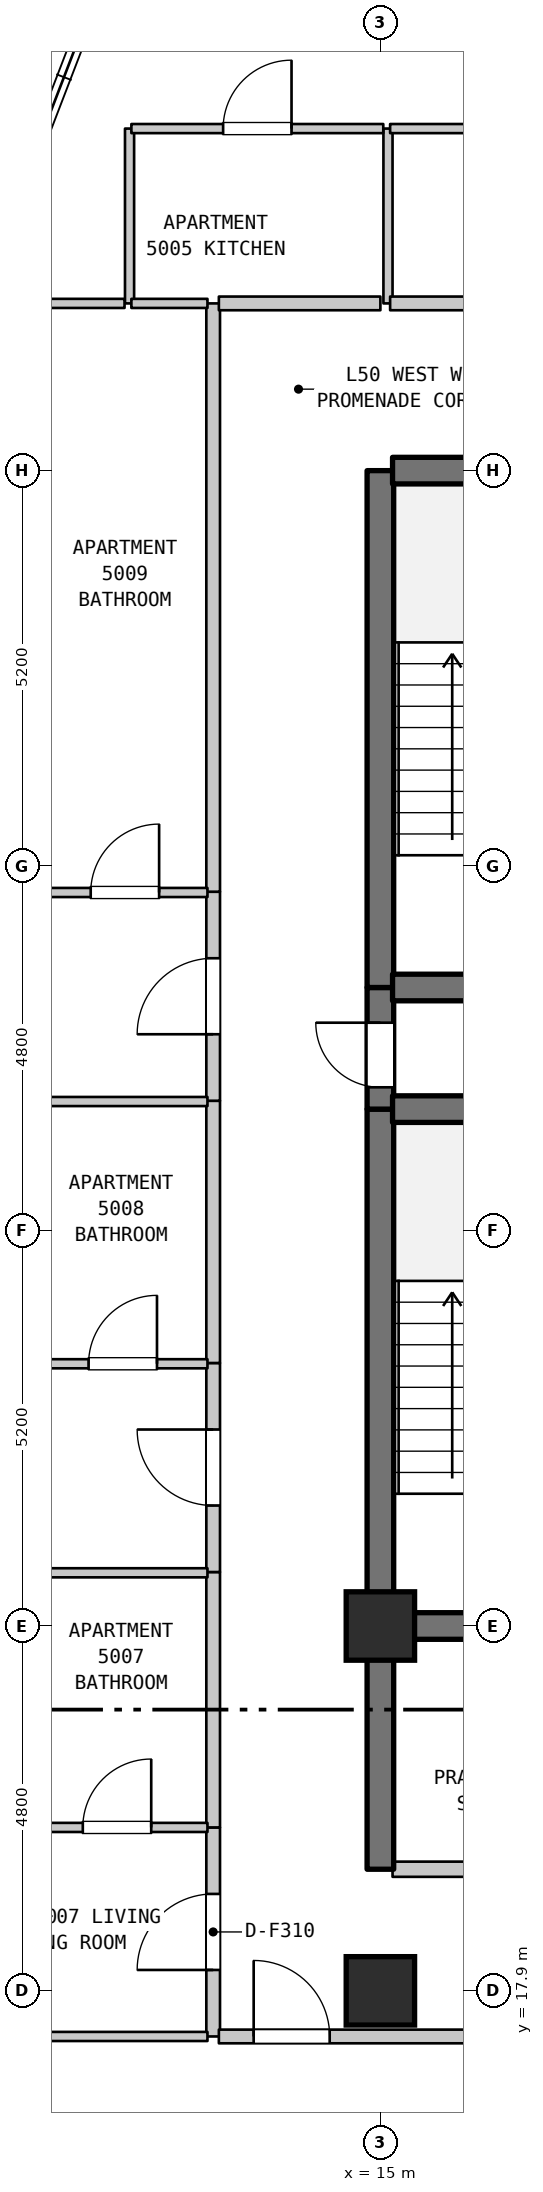
"""IFC4 building model, lengths in metres.
Left out: names, types, materials, properties, quantities, classifications, styles, units other than length and angle.
Written with IfcOpenShell. Run it as: python <this file> out.ifc"""

import sys

from ifc_helpers import new_model, si_unit, direction, frame, frame_2d, origin, origin_2d, place, context, subcontext, project, spatial, rectangle, extrude, element, fill, save


model = new_model("IFC4")
c1 = context("Model", 3, precision=1e-05, world=origin(), true_north=direction((0.0, 1.0)))
c2 = subcontext(c1, "Body", "Model", "MODEL_VIEW")
j1 = project(units=[si_unit("LENGTHUNIT", "METRE"), si_unit("PLANEANGLEUNIT", "RADIAN")], contexts=[c1])
p1 = place(None, origin())
s1 = spatial("IfcSite", under=j1, at=p1, CompositionType="ELEMENT")
p2 = place(p1, origin())
s2 = spatial("IfcBuilding", under=s1, at=p2, CompositionType="ELEMENT")
p3 = place(p2, frame((0.0, 0.0, 203.2)))
s3 = spatial("IfcBuildingStorey", under=s2, at=p3, CompositionType="ELEMENT", Elevation=203.2)
for number, where, z_axis, x_axis in (
    (1, (15.0, 17.9, 0.0), (0.0, 0.0, 1.0), (1.0, 0.0, 0.0)),
    (2, (15.0, 22.7, 0.0), (0.0, 0.0, 1.0), (1.0, 0.0, 0.0)),
):
    element("IfcColumn", number, at=place(p3, frame(where, z_axis=z_axis, x_axis=x_axis)), inside=s3, PredefinedType="COLUMN", context=c2, shape_type="SweptSolid", body=[
        extrude(rectangle(XDim=0.9, YDim=0.9, at=origin_2d()), origin(), (0.0, 0.0, 1.0), 3.7),
    ])
p4 = place(p3, frame((11.7, 40.1, 0.0), z_axis=(0.0, 0.0, 1.0), x_axis=(0.0, 1.0, 0.0)))
e3 = element("IfcWall", 3, at=p4, inside=s3, PredefinedType="PARTITIONING", context=c2, shape_type="SweptSolid", body=[
    extrude(rectangle(XDim=2.3, YDim=0.12, at=frame_2d((1.15, 0.0))), origin(), (0.0, 0.0, 1.0), 3.39),
])
p5 = place(p3, frame((12.8, 17.3, 0.0), z_axis=(0.0, 0.0, 1.0), x_axis=(0.0, 1.0, 0.0)))
e4 = element("IfcWall", 4, at=p5, inside=s3, PredefinedType="STANDARD", context=c2, shape_type="SweptSolid", body=[
    extrude(rectangle(XDim=2.75, YDim=0.18, at=frame_2d((1.375, 0.0))), origin(), (0.0, 0.0, 1.0), 3.39),
])
p6 = place(p5, frame((0.875, 0.0, 0.0)))
e5 = element("IfcOpeningElement", 5, at=p6, cuts=e4, PredefinedType="OPENING", context=c2, shape_type="SweptSolid", body=[
    extrude(rectangle(XDim=1.0, YDim=2.15, at=frame_2d((0.5, 1.075))), frame((0.0, 0.1, 0.0), z_axis=(0.0, -1.0, 0.0), x_axis=(1.0, 0.0, 0.0)), (0.0, 0.0, 1.0), 0.2),
])
p7 = place(p3, frame((12.8, 20.05, 0.0), z_axis=(0.0, 0.0, 1.0), x_axis=(0.0, 1.0, 0.0)))
e6 = element("IfcWall", 6, at=p7, inside=s3, PredefinedType="STANDARD", context=c2, shape_type="SweptSolid", body=[
    extrude(rectangle(XDim=3.36, YDim=0.18, at=frame_2d((1.68, 0.0))), origin(), (0.0, 0.0, 1.0), 3.39),
])
p8 = place(p3, frame((12.8, 23.41, 0.0), z_axis=(0.0, 0.0, 1.0), x_axis=(0.0, 1.0, 0.0)))
e7 = element("IfcWall", 7, at=p8, inside=s3, PredefinedType="STANDARD", context=c2, shape_type="SweptSolid", body=[
    extrude(rectangle(XDim=2.75, YDim=0.18, at=frame_2d((1.375, 0.0))), origin(), (0.0, 0.0, 1.0), 3.39),
])
p9 = place(p8, frame((0.875, 0.0, 0.0)))
e8 = element("IfcOpeningElement", 8, at=p9, cuts=e7, PredefinedType="OPENING", context=c2, shape_type="SweptSolid", body=[
    extrude(rectangle(XDim=1.0, YDim=2.15, at=frame_2d((0.5, 1.075))), frame((0.0, 0.1, 0.0), z_axis=(0.0, -1.0, 0.0), x_axis=(1.0, 0.0, 0.0)), (0.0, 0.0, 1.0), 0.2),
])
p10 = place(p3, frame((12.8, 26.16, 0.0), z_axis=(0.0, 0.0, 1.0), x_axis=(0.0, 1.0, 0.0)))
e9 = element("IfcWall", 9, at=p10, inside=s3, PredefinedType="STANDARD", context=c2, shape_type="SweptSolid", body=[
    extrude(rectangle(XDim=3.45, YDim=0.18, at=frame_2d((1.725, 0.0))), origin(), (0.0, 0.0, 1.0), 3.39),
])
p11 = place(p3, frame((12.8, 29.61, 0.0), z_axis=(0.0, 0.0, 1.0), x_axis=(0.0, 1.0, 0.0)))
e10 = element("IfcWall", 10, at=p11, inside=s3, PredefinedType="STANDARD", context=c2, shape_type="SweptSolid", body=[
    extrude(rectangle(XDim=2.75, YDim=0.18, at=frame_2d((1.375, 0.0))), origin(), (0.0, 0.0, 1.0), 3.39),
])
p12 = place(p11, frame((0.875, 0.0, 0.0)))
e11 = element("IfcOpeningElement", 11, at=p12, cuts=e10, PredefinedType="OPENING", context=c2, shape_type="SweptSolid", body=[
    extrude(rectangle(XDim=1.0, YDim=2.15, at=frame_2d((0.5, 1.075))), frame((0.0, 0.1, 0.0), z_axis=(0.0, -1.0, 0.0), x_axis=(1.0, 0.0, 0.0)), (0.0, 0.0, 1.0), 0.2),
])
p13 = place(p3, frame((12.8, 32.36, 0.0), z_axis=(0.0, 0.0, 1.0), x_axis=(0.0, 1.0, 0.0)))
e12 = element("IfcWall", 12, at=p13, inside=s3, PredefinedType="STANDARD", context=c2, shape_type="SweptSolid", body=[
    extrude(rectangle(XDim=7.74, YDim=0.18, at=frame_2d((3.87, 0.0))), origin(), (0.0, 0.0, 1.0), 3.39),
])
p14 = place(p3, frame((15.0, 19.5, 0.0), z_axis=(0.0, 0.0, 1.0), x_axis=(0.0, 1.0, 0.0)))
e13 = element("IfcWall", 13, at=p14, inside=s3, PredefinedType="SHEAR", context=c2, shape_type="SweptSolid", body=[
    extrude(rectangle(XDim=3.2, YDim=0.35, at=frame_2d((1.6, 0.0))), origin(), (0.0, 0.0, 1.0), 3.39),
])
p15 = place(p3, frame((15.0, 22.7, 0.0), z_axis=(0.0, 0.0, 1.0), x_axis=(0.0, 1.0, 0.0)))
e14 = element("IfcWall", 14, at=p15, inside=s3, PredefinedType="SHEAR", context=c2, shape_type="SweptSolid", body=[
    extrude(rectangle(XDim=6.8, YDim=0.35, at=frame_2d((3.4, 0.0))), origin(), (0.0, 0.0, 1.0), 3.39),
])
p16 = place(p3, frame((15.0, 29.5, 0.0), z_axis=(0.0, 0.0, 1.0), x_axis=(0.0, 1.0, 0.0)))
e15 = element("IfcWall", 15, at=p16, inside=s3, PredefinedType="SHEAR", context=c2, shape_type="SweptSolid", body=[
    extrude(rectangle(XDim=1.6, YDim=0.35, at=frame_2d((0.8, 0.0))), origin(), (0.0, 0.0, 1.0), 3.39),
])
p17 = place(p16, frame((0.287, 0.0, 0.0)))
e16 = element("IfcOpeningElement", 16, at=p17, cuts=e15, PredefinedType="OPENING", context=c2, shape_type="SweptSolid", body=[
    extrude(rectangle(XDim=0.85, YDim=2.1, at=frame_2d((0.425, 1.05))), frame((0.0, 0.185, 0.0), z_axis=(0.0, -1.0, 0.0), x_axis=(1.0, 0.0, 0.0)), (0.0, 0.0, 1.0), 0.37),
])
p18 = place(p3, frame((15.0, 31.1, 0.0), z_axis=(0.0, 0.0, 1.0), x_axis=(0.0, 1.0, 0.0)))
e17 = element("IfcWall", 17, at=p18, inside=s3, PredefinedType="SHEAR", context=c2, shape_type="SweptSolid", body=[
    extrude(rectangle(XDim=6.8, YDim=0.35, at=frame_2d((3.4, 0.0))), origin(), (0.0, 0.0, 1.0), 3.39),
])
p19 = place(p3, frame((15.1, 40.1, 0.0), z_axis=(0.0, 0.0, 1.0), x_axis=(0.0, 1.0, 0.0)))
e18 = element("IfcWall", 18, at=p19, inside=s3, PredefinedType="PARTITIONING", context=c2, shape_type="SweptSolid", body=[
    extrude(rectangle(XDim=2.3, YDim=0.12, at=frame_2d((1.15, 0.0))), origin(), (0.0, 0.0, 1.0), 3.39),
])
p20 = place(p3, frame((9.085, 17.3, 0.0), z_axis=(0.0, 0.0, 1.0), x_axis=(1.0, 0.0, 0.0)))
e19 = element("IfcWall", 19, at=p20, inside=s3, PredefinedType="PARTITIONING", context=c2, shape_type="SweptSolid", body=[
    extrude(rectangle(XDim=3.64, YDim=0.12, at=frame_2d((1.82, 0.0))), origin(), (0.0, 0.0, 1.0), 3.39),
])
p21 = place(p3, frame((12.875, 17.3, 0.0), z_axis=(0.0, 0.0, 1.0), x_axis=(1.0, 0.0, 0.0)))
e20 = element("IfcWall", 20, at=p21, inside=s3, PredefinedType="STANDARD", context=c2, shape_type="SweptSolid", body=[
    extrude(rectangle(XDim=3.78, YDim=0.18, at=frame_2d((1.89, 0.0))), origin(), (0.0, 0.0, 1.0), 3.39),
])
p22 = place(p21, frame((0.458, 0.0, 0.0)))
e21 = element("IfcOpeningElement", 21, at=p22, cuts=e20, PredefinedType="OPENING", context=c2, shape_type="SweptSolid", body=[
    extrude(rectangle(XDim=1.0, YDim=2.15, at=frame_2d((0.5, 1.075))), frame((0.0, 0.1, 0.0), z_axis=(0.0, -1.0, 0.0), x_axis=(1.0, 0.0, 0.0)), (0.0, 0.0, 1.0), 0.2),
])
p23 = place(p3, frame((15.16, 19.5, 0.0), z_axis=(0.0, 0.0, 1.0), x_axis=(1.0, 0.0, 0.0)))
e22 = element("IfcWall", 22, at=p23, inside=s3, PredefinedType="STANDARD", context=c2, shape_type="SweptSolid", body=[
    extrude(rectangle(XDim=3.68, YDim=0.2, at=frame_2d((1.84, 0.0))), origin(), (0.0, 0.0, 1.0), 3.39),
])
p24 = place(p23, frame((1.39, 0.0, 0.0)))
e23 = element("IfcOpeningElement", 23, at=p24, cuts=e22, PredefinedType="OPENING", context=c2, shape_type="SweptSolid", body=[
    extrude(rectangle(XDim=0.9, YDim=2.15, at=frame_2d((0.45, 1.075))), frame((0.0, 0.11, 0.0), z_axis=(0.0, -1.0, 0.0), x_axis=(1.0, 0.0, 0.0)), (0.0, 0.0, 1.0), 0.22),
])
p25 = place(p3, frame((10.456, 20.05, 0.0), z_axis=(0.0, 0.0, 1.0), x_axis=(1.0, 0.0, 0.0)))
e24 = element("IfcWall", 24, at=p25, inside=s3, PredefinedType="PARTITIONING", context=c2, shape_type="SweptSolid", body=[
    extrude(rectangle(XDim=2.269, YDim=0.12, at=frame_2d((1.135, 0.0))), origin(), (0.0, 0.0, 1.0), 3.39),
])
p26 = place(p25, frame((0.629, 0.0, 0.0)))
e25 = element("IfcOpeningElement", 25, at=p26, cuts=e24, PredefinedType="OPENING", context=c2, shape_type="SweptSolid", body=[
    extrude(rectangle(XDim=0.9, YDim=2.1, at=frame_2d((0.45, 1.05))), frame((0.0, 0.07, 0.0), z_axis=(0.0, -1.0, 0.0), x_axis=(1.0, 0.0, 0.0)), (0.0, 0.0, 1.0), 0.14),
])
p27 = place(p3, frame((15.16, 22.7, 0.0), z_axis=(0.0, 0.0, 1.0), x_axis=(1.0, 0.0, 0.0)))
e26 = element("IfcWall", 26, at=p27, inside=s3, PredefinedType="SHEAR", context=c2, shape_type="SweptSolid", body=[
    extrude(rectangle(XDim=3.68, YDim=0.35, at=frame_2d((1.84, 0.0))), origin(), (0.0, 0.0, 1.0), 3.39),
])
p28 = place(p3, frame((10.456, 23.4, 0.0), z_axis=(0.0, 0.0, 1.0), x_axis=(1.0, 0.0, 0.0)))
e27 = element("IfcWall", 27, at=p28, inside=s3, PredefinedType="PARTITIONING", context=c2, shape_type="SweptSolid", body=[
    extrude(rectangle(XDim=2.269, YDim=0.12, at=frame_2d((1.135, 0.0))), origin(), (0.0, 0.0, 1.0), 3.39),
])
p29 = place(p3, frame((10.466, 26.15, 0.0), z_axis=(0.0, 0.0, 1.0), x_axis=(1.0, 0.0, 0.0)))
e28 = element("IfcWall", 28, at=p29, inside=s3, PredefinedType="PARTITIONING", context=c2, shape_type="SweptSolid", body=[
    extrude(rectangle(XDim=2.259, YDim=0.12, at=frame_2d((1.129, 0.0))), origin(), (0.0, 0.0, 1.0), 3.39),
])
p30 = place(p29, frame((0.695, 0.0, 0.0)))
e29 = element("IfcOpeningElement", 29, at=p30, cuts=e28, PredefinedType="OPENING", context=c2, shape_type="SweptSolid", body=[
    extrude(rectangle(XDim=0.9, YDim=2.1, at=frame_2d((0.45, 1.05))), frame((0.0, 0.07, 0.0), z_axis=(0.0, -1.0, 0.0), x_axis=(1.0, 0.0, 0.0)), (0.0, 0.0, 1.0), 0.14),
])
p31 = place(p3, frame((15.16, 29.5, 0.0), z_axis=(0.0, 0.0, 1.0), x_axis=(1.0, 0.0, 0.0)))
e30 = element("IfcWall", 30, at=p31, inside=s3, PredefinedType="SHEAR", context=c2, shape_type="SweptSolid", body=[
    extrude(rectangle(XDim=3.68, YDim=0.35, at=frame_2d((1.84, 0.0))), origin(), (0.0, 0.0, 1.0), 3.39),
])
p32 = place(p3, frame((10.466, 29.6, 0.0), z_axis=(0.0, 0.0, 1.0), x_axis=(1.0, 0.0, 0.0)))
e31 = element("IfcWall", 31, at=p32, inside=s3, PredefinedType="PARTITIONING", context=c2, shape_type="SweptSolid", body=[
    extrude(rectangle(XDim=2.259, YDim=0.12, at=frame_2d((1.129, 0.0))), origin(), (0.0, 0.0, 1.0), 3.39),
])
p33 = place(p3, frame((15.16, 31.1, 0.0), z_axis=(0.0, 0.0, 1.0), x_axis=(1.0, 0.0, 0.0)))
e32 = element("IfcWall", 32, at=p33, inside=s3, PredefinedType="SHEAR", context=c2, shape_type="SweptSolid", body=[
    extrude(rectangle(XDim=3.68, YDim=0.35, at=frame_2d((1.84, 0.0))), origin(), (0.0, 0.0, 1.0), 3.39),
])
p34 = place(p3, frame((10.523, 32.35, 0.0), z_axis=(0.0, 0.0, 1.0), x_axis=(1.0, 0.0, 0.0)))
e33 = element("IfcWall", 33, at=p34, inside=s3, PredefinedType="PARTITIONING", context=c2, shape_type="SweptSolid", body=[
    extrude(rectangle(XDim=2.202, YDim=0.12, at=frame_2d((1.101, 0.0))), origin(), (0.0, 0.0, 1.0), 3.39),
])
p35 = place(p34, frame((0.666, 0.0, 0.0)))
e34 = element("IfcOpeningElement", 34, at=p35, cuts=e33, PredefinedType="OPENING", context=c2, shape_type="SweptSolid", body=[
    extrude(rectangle(XDim=0.9, YDim=2.1, at=frame_2d((0.45, 1.05))), frame((0.0, 0.07, 0.0), z_axis=(0.0, -1.0, 0.0), x_axis=(1.0, 0.0, 0.0)), (0.0, 0.0, 1.0), 0.14),
])
p36 = place(p3, frame((15.16, 37.9, 0.0), z_axis=(0.0, 0.0, 1.0), x_axis=(1.0, 0.0, 0.0)))
e35 = element("IfcWall", 35, at=p36, inside=s3, PredefinedType="SHEAR", context=c2, shape_type="SweptSolid", body=[
    extrude(rectangle(XDim=3.68, YDim=0.35, at=frame_2d((1.84, 0.0))), origin(), (0.0, 0.0, 1.0), 3.39),
])
p37 = place(p3, frame((10.523, 40.1, 0.0), z_axis=(0.0, 0.0, 1.0), x_axis=(1.0, 0.0, 0.0)))
e36 = element("IfcWall", 36, at=p37, inside=s3, PredefinedType="PARTITIONING", context=c2, shape_type="SweptSolid", body=[
    extrude(rectangle(XDim=1.111, YDim=0.12, at=frame_2d((0.556, 0.0))), origin(), (0.0, 0.0, 1.0), 3.39),
])
p38 = place(p3, frame((11.724, 40.1, 0.0), z_axis=(0.0, 0.0, 1.0), x_axis=(1.0, 0.0, 0.0)))
e37 = element("IfcWall", 37, at=p38, inside=s3, PredefinedType="PARTITIONING", context=c2, shape_type="SweptSolid", body=[
    extrude(rectangle(XDim=1.001, YDim=0.12, at=frame_2d((0.5, 0.0))), origin(), (0.0, 0.0, 1.0), 3.39),
])
p39 = place(p3, frame((12.875, 40.1, 0.0), z_axis=(0.0, 0.0, 1.0), x_axis=(1.0, 0.0, 0.0)))
e38 = element("IfcWall", 38, at=p39, inside=s3, PredefinedType="STANDARD", context=c2, shape_type="SweptSolid", body=[
    extrude(rectangle(XDim=2.125, YDim=0.18, at=frame_2d((1.062, 0.0))), origin(), (0.0, 0.0, 1.0), 3.39),
])
p40 = place(p3, frame((15.128, 40.1, 0.0), z_axis=(0.0, 0.0, 1.0), x_axis=(1.0, 0.0, 0.0)))
e39 = element("IfcWall", 39, at=p40, inside=s3, PredefinedType="STANDARD", context=c2, shape_type="SweptSolid", body=[
    extrude(rectangle(XDim=3.907, YDim=0.18, at=frame_2d((1.954, 0.0))), origin(), (0.0, 0.0, 1.0), 3.39),
])
p41 = place(p3, frame((11.724, 42.4, 0.0), z_axis=(0.0, 0.0, 1.0), x_axis=(1.0, 0.0, 0.0)))
e40 = element("IfcWall", 40, at=p41, inside=s3, PredefinedType="PARTITIONING", context=c2, shape_type="SweptSolid", body=[
    extrude(rectangle(XDim=3.314, YDim=0.12, at=frame_2d((1.657, 0.0))), origin(), (0.0, 0.0, 1.0), 3.39),
])
p42 = place(p41, frame((1.207, 0.0, 0.0)))
e41 = element("IfcOpeningElement", 41, at=p42, cuts=e40, PredefinedType="OPENING", context=c2, shape_type="SweptSolid", body=[
    extrude(rectangle(XDim=0.9, YDim=2.15, at=frame_2d((0.45, 1.075))), frame((0.0, 0.07, 0.0), z_axis=(0.0, -1.0, 0.0), x_axis=(1.0, 0.0, 0.0)), (0.0, 0.0, 1.0), 0.14),
])
p43 = place(p3, frame((15.128, 42.4, 0.0), z_axis=(0.0, 0.0, 1.0), x_axis=(1.0, 0.0, 0.0)))
e42 = element("IfcWall", 42, at=p43, inside=s3, PredefinedType="PARTITIONING", context=c2, shape_type="SweptSolid", body=[
    extrude(rectangle(XDim=3.907, YDim=0.12, at=frame_2d((1.954, 0.0))), origin(), (0.0, 0.0, 1.0), 3.39),
])
p44 = place(p43, frame((1.503, 0.0, 0.0)))
e43 = element("IfcOpeningElement", 43, at=p44, cuts=e42, PredefinedType="OPENING", context=c2, shape_type="SweptSolid", body=[
    extrude(rectangle(XDim=0.9, YDim=2.1, at=frame_2d((0.45, 1.05))), frame((0.0, 0.07, 0.0), z_axis=(0.0, -1.0, 0.0), x_axis=(1.0, 0.0, 0.0)), (0.0, 0.0, 1.0), 0.14),
])
p45 = place(p6, origin())
e44 = element("IfcDoor", 44, at=p45, inside=s3, OperationType="SINGLE_SWING_LEFT", PredefinedType="DOOR", context=c2, shape_type="SweptSolid", body=[
    extrude(rectangle(XDim=1.0, YDim=2.15, at=frame_2d((0.5, 1.075))), frame((0.0, 0.025, 0.0), z_axis=(0.0, -1.0, 0.0), x_axis=(1.0, 0.0, 0.0)), (0.0, 0.0, 1.0), 0.05),
])
fill(e5, e44)
p46 = place(p9, origin())
e45 = element("IfcDoor", 45, at=p46, inside=s3, OperationType="SINGLE_SWING_RIGHT", PredefinedType="DOOR", context=c2, shape_type="SweptSolid", body=[
    extrude(rectangle(XDim=1.0, YDim=2.15, at=frame_2d((0.5, 1.075))), frame((0.0, 0.025, 0.0), z_axis=(0.0, -1.0, 0.0), x_axis=(1.0, 0.0, 0.0)), (0.0, 0.0, 1.0), 0.05),
])
fill(e8, e45)
p47 = place(p12, origin())
e46 = element("IfcDoor", 46, at=p47, inside=s3, OperationType="SINGLE_SWING_LEFT", PredefinedType="DOOR", context=c2, shape_type="SweptSolid", body=[
    extrude(rectangle(XDim=1.0, YDim=2.15, at=frame_2d((0.5, 1.075))), frame((0.0, 0.025, 0.0), z_axis=(0.0, -1.0, 0.0), x_axis=(1.0, 0.0, 0.0)), (0.0, 0.0, 1.0), 0.05),
])
fill(e11, e46)
p48 = place(p17, origin())
e47 = element("IfcDoor", 47, at=p48, inside=s3, OperationType="SINGLE_SWING_RIGHT", PredefinedType="DOOR", context=c2, shape_type="SweptSolid", body=[
    extrude(rectangle(XDim=0.85, YDim=2.1, at=frame_2d((0.425, 1.05))), frame((0.0, 0.025, 0.0), z_axis=(0.0, -1.0, 0.0), x_axis=(1.0, 0.0, 0.0)), (0.0, 0.0, 1.0), 0.05),
])
fill(e16, e47)
p49 = place(p22, origin())
e48 = element("IfcDoor", 48, at=p49, inside=s3, OperationType="SINGLE_SWING_LEFT", PredefinedType="DOOR", context=c2, shape_type="SweptSolid", body=[
    extrude(rectangle(XDim=1.0, YDim=2.15, at=frame_2d((0.5, 1.075))), frame((0.0, 0.025, 0.0), z_axis=(0.0, -1.0, 0.0), x_axis=(1.0, 0.0, 0.0)), (0.0, 0.0, 1.0), 0.05),
])
fill(e21, e48)
p50 = place(p26, origin())
e49 = element("IfcDoor", 49, at=p50, inside=s3, OperationType="SINGLE_SWING_RIGHT", PredefinedType="DOOR", context=c2, shape_type="SweptSolid", body=[
    extrude(rectangle(XDim=0.9, YDim=2.1, at=frame_2d((0.45, 1.05))), frame((0.0, 0.025, 0.0), z_axis=(0.0, -1.0, 0.0), x_axis=(1.0, 0.0, 0.0)), (0.0, 0.0, 1.0), 0.05),
])
fill(e25, e49)
p51 = place(p30, origin())
e50 = element("IfcDoor", 50, at=p51, inside=s3, OperationType="SINGLE_SWING_RIGHT", PredefinedType="DOOR", context=c2, shape_type="SweptSolid", body=[
    extrude(rectangle(XDim=0.9, YDim=2.1, at=frame_2d((0.45, 1.05))), frame((0.0, 0.025, 0.0), z_axis=(0.0, -1.0, 0.0), x_axis=(1.0, 0.0, 0.0)), (0.0, 0.0, 1.0), 0.05),
])
fill(e29, e50)
p52 = place(p35, origin())
e51 = element("IfcDoor", 51, at=p52, inside=s3, OperationType="SINGLE_SWING_RIGHT", PredefinedType="DOOR", context=c2, shape_type="SweptSolid", body=[
    extrude(rectangle(XDim=0.9, YDim=2.1, at=frame_2d((0.45, 1.05))), frame((0.0, 0.025, 0.0), z_axis=(0.0, -1.0, 0.0), x_axis=(1.0, 0.0, 0.0)), (0.0, 0.0, 1.0), 0.05),
])
fill(e34, e51)
p53 = place(p42, origin())
e52 = element("IfcDoor", 52, at=p53, inside=s3, OperationType="SINGLE_SWING_RIGHT", PredefinedType="DOOR", context=c2, shape_type="SweptSolid", body=[
    extrude(rectangle(XDim=0.9, YDim=2.15, at=frame_2d((0.45, 1.075))), frame((0.0, 0.025, 0.0), z_axis=(0.0, -1.0, 0.0), x_axis=(1.0, 0.0, 0.0)), (0.0, 0.0, 1.0), 0.05),
])
fill(e41, e52)
save(model, sys.argv[1])
